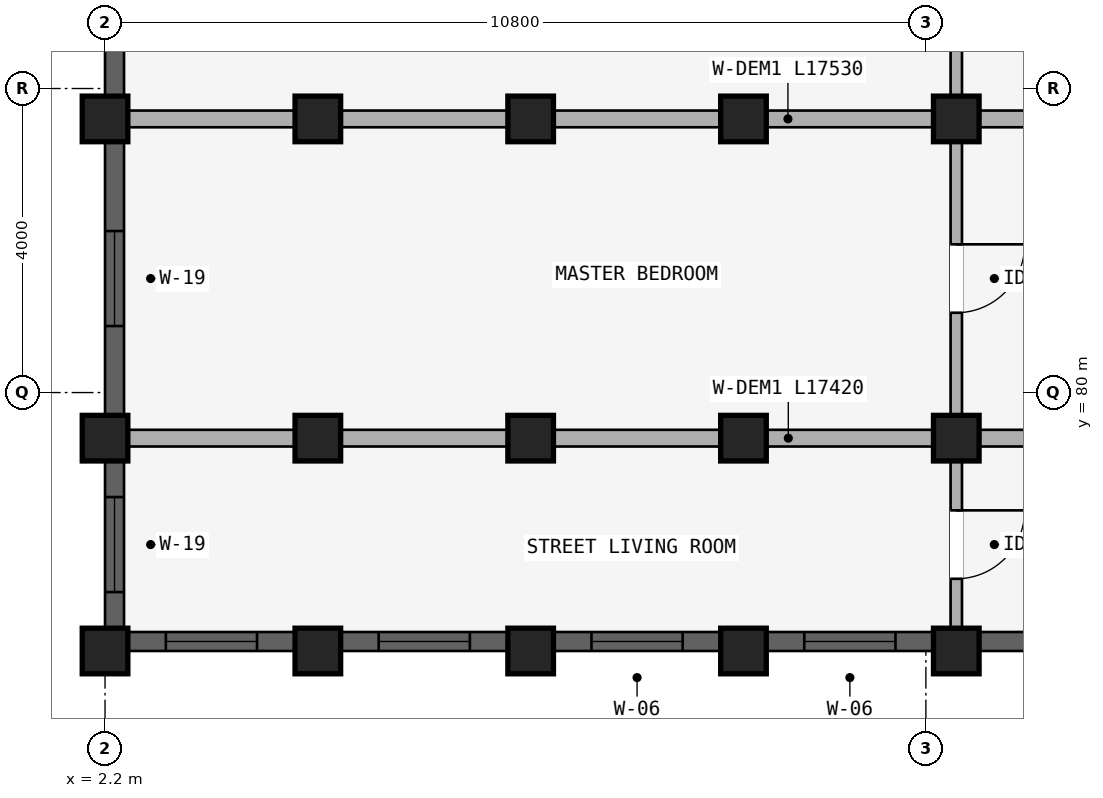
"""IFC4 building model, lengths in metres.
Left out: names, types, materials, properties, quantities, classifications, styles, units other than length and angle.
Written with IfcOpenShell. Run it as: python <this file> out.ifc"""

import sys

from ifc_helpers import new_model, si_unit, direction, frame, frame_2d, origin, origin_2d, place, context, subcontext, project, spatial, rectangle, extrude, element, fill, save


model = new_model("IFC4")
c1 = context("Model", 3, precision=1e-05, world=origin(), true_north=direction((0.0, 1.0)))
c2 = subcontext(c1, "Body", "Model", "MODEL_VIEW")
j1 = project(units=[si_unit("LENGTHUNIT", "METRE"), si_unit("PLANEANGLEUNIT", "RADIAN")], contexts=[c1])
p1 = place(None, origin())
s1 = spatial("IfcSite", under=j1, at=p1, CompositionType="ELEMENT")
p2 = place(p1, origin())
s2 = spatial("IfcBuilding", under=s1, at=p2, CompositionType="ELEMENT")
p3 = place(p2, frame((0.0, 0.0, 37.05)))
s3 = spatial("IfcBuildingStorey", under=s2, at=p3, CompositionType="ELEMENT", Elevation=37.05)
for number, where, z_axis, x_axis in (
    (1, (13.4, 83.6, 0.0), (0.0, 0.0, 1.0), (1.0, 0.0, 0.0)),
    (2, (10.6, 83.6, 0.0), (0.0, 0.0, 1.0), (1.0, 0.0, 0.0)),
    (3, (7.8, 83.6, 0.0), (0.0, 0.0, 1.0), (1.0, 0.0, 0.0)),
    (4, (5.0, 83.6, 0.0), (0.0, 0.0, 1.0), (1.0, 0.0, 0.0)),
):
    element("IfcColumn", number, at=place(p3, frame(where, z_axis=z_axis, x_axis=x_axis)), inside=s3, PredefinedType="COLUMN", context=c2, shape_type="SweptSolid", body=[
        extrude(rectangle(XDim=0.6, YDim=0.6, at=origin_2d()), origin(), (0.0, 0.0, 1.0), 2.93),
    ])
p4 = place(p3, frame((2.2, 83.6, 0.0), z_axis=(0.0, 0.0, 1.0), x_axis=(1.0, 0.0, 0.0)))
e5 = element("IfcColumn", 5, at=p4, inside=s3, PredefinedType="COLUMN", context=c2, shape_type="SweptSolid", body=[
    extrude(rectangle(XDim=0.6, YDim=0.6, at=origin_2d()), origin(), (0.0, 0.0, 1.0), 2.97),
])
for number, where, z_axis, x_axis in (
    (6, (13.4, 79.4, 0.0), (0.0, 0.0, 1.0), (1.0, 0.0, 0.0)),
    (7, (10.6, 79.4, 0.0), (0.0, 0.0, 1.0), (1.0, 0.0, 0.0)),
    (8, (7.8, 79.4, 0.0), (0.0, 0.0, 1.0), (1.0, 0.0, 0.0)),
    (9, (5.0, 79.4, 0.0), (0.0, 0.0, 1.0), (1.0, 0.0, 0.0)),
):
    element("IfcColumn", number, at=place(p3, frame(where, z_axis=z_axis, x_axis=x_axis)), inside=s3, PredefinedType="COLUMN", context=c2, shape_type="SweptSolid", body=[
        extrude(rectangle(XDim=0.6, YDim=0.6, at=origin_2d()), origin(), (0.0, 0.0, 1.0), 2.93),
    ])
p5 = place(p3, frame((2.2, 79.4, 0.0), z_axis=(0.0, 0.0, 1.0), x_axis=(1.0, 0.0, 0.0)))
e10 = element("IfcColumn", 10, at=p5, inside=s3, PredefinedType="COLUMN", context=c2, shape_type="SweptSolid", body=[
    extrude(rectangle(XDim=0.6, YDim=0.6, at=origin_2d()), origin(), (0.0, 0.0, 1.0), 2.97),
])
for number, where, z_axis, x_axis in (
    (11, (13.4, 76.6, 0.0), (0.0, 0.0, 1.0), (1.0, 0.0, 0.0)),
    (12, (10.6, 76.6, 0.0), (0.0, 0.0, 1.0), (1.0, 0.0, 0.0)),
    (13, (7.8, 76.6, 0.0), (0.0, 0.0, 1.0), (1.0, 0.0, 0.0)),
    (14, (5.0, 76.6, 0.0), (0.0, 0.0, 1.0), (1.0, 0.0, 0.0)),
):
    element("IfcColumn", number, at=place(p3, frame(where, z_axis=z_axis, x_axis=x_axis)), inside=s3, PredefinedType="COLUMN", context=c2, shape_type="SweptSolid", body=[
        extrude(rectangle(XDim=0.6, YDim=0.6, at=origin_2d()), origin(), (0.0, 0.0, 1.0), 2.93),
    ])
p6 = place(p3, frame((2.2, 76.6, 0.0), z_axis=(0.0, 0.0, 1.0), x_axis=(1.0, 0.0, 0.0)))
e15 = element("IfcColumn", 15, at=p6, inside=s3, PredefinedType="COLUMN", context=c2, shape_type="SweptSolid", body=[
    extrude(rectangle(XDim=0.6, YDim=0.6, at=origin_2d()), origin(), (0.0, 0.0, 1.0), 2.97),
])
p7 = place(p3, frame((13.4, 87.57, 0.0), z_axis=(0.0, 0.0, 1.0), x_axis=(0.0, -1.0, 0.0)))
e16 = element("IfcWall", 16, at=p7, inside=s3, PredefinedType="PARTITIONING", context=c2, shape_type="SweptSolid", body=[
    extrude(rectangle(XDim=3.89, YDim=0.15, at=frame_2d((1.945, 0.0))), origin(), (0.0, 0.0, 1.0), 2.372),
])
p8 = place(p7, frame((1.495, 0.0, 0.0)))
e17 = element("IfcOpeningElement", 17, at=p8, cuts=e16, PredefinedType="OPENING", context=c2, shape_type="SweptSolid", body=[
    extrude(rectangle(XDim=0.9, YDim=2.1, at=frame_2d((0.45, 1.05))), frame((0.0, 0.085, 0.0), z_axis=(0.0, -1.0, 0.0), x_axis=(1.0, 0.0, 0.0)), (0.0, 0.0, 1.0), 0.17),
])
p9 = place(p3, frame((13.4, 83.52, 0.0), z_axis=(0.0, 0.0, 1.0), x_axis=(0.0, -1.0, 0.0)))
e18 = element("IfcWall", 18, at=p9, inside=s3, PredefinedType="PARTITIONING", context=c2, shape_type="SweptSolid", body=[
    extrude(rectangle(XDim=4.04, YDim=0.15, at=frame_2d((2.02, 0.0))), origin(), (0.0, 0.0, 1.0), 2.372),
])
p10 = place(p9, frame((1.57, 0.0, 0.0)))
e19 = element("IfcOpeningElement", 19, at=p10, cuts=e18, PredefinedType="OPENING", context=c2, shape_type="SweptSolid", body=[
    extrude(rectangle(XDim=0.9, YDim=2.1, at=frame_2d((0.45, 1.05))), frame((0.0, 0.085, 0.0), z_axis=(0.0, -1.0, 0.0), x_axis=(1.0, 0.0, 0.0)), (0.0, 0.0, 1.0), 0.17),
])
p11 = place(p3, frame((19.95, 83.6, 0.0), z_axis=(0.0, 0.0, 1.0), x_axis=(-1.0, 0.0, 0.0)))
e20 = element("IfcWall", 20, at=p11, inside=s3, PredefinedType="STANDARD", context=c2, shape_type="SweptSolid", body=[
    extrude(rectangle(XDim=17.53, YDim=0.22, at=frame_2d((8.765, 0.0))), origin(), (0.0, 0.0, 1.0), 2.372),
])
p12 = place(p3, frame((13.4, 79.32, 0.0), z_axis=(0.0, 0.0, 1.0), x_axis=(0.0, -1.0, 0.0)))
e21 = element("IfcWall", 21, at=p12, inside=s3, PredefinedType="PLUMBINGWALL", context=c2, shape_type="SweptSolid", body=[
    extrude(rectangle(XDim=2.64, YDim=0.15, at=frame_2d((1.32, 0.0))), origin(), (0.0, 0.0, 1.0), 2.372),
])
p13 = place(p12, frame((0.87, 0.0, 0.0)))
e22 = element("IfcOpeningElement", 22, at=p13, cuts=e21, PredefinedType="OPENING", context=c2, shape_type="SweptSolid", body=[
    extrude(rectangle(XDim=0.9, YDim=2.1, at=frame_2d((0.45, 1.05))), frame((0.0, 0.085, 0.0), z_axis=(0.0, -1.0, 0.0), x_axis=(1.0, 0.0, 0.0)), (0.0, 0.0, 1.0), 0.17),
])
p14 = place(p3, frame((19.9, 79.4, 0.0), z_axis=(0.0, 0.0, 1.0), x_axis=(-1.0, 0.0, 0.0)))
e23 = element("IfcWall", 23, at=p14, inside=s3, PredefinedType="STANDARD", context=c2, shape_type="SweptSolid", body=[
    extrude(rectangle(XDim=17.42, YDim=0.22, at=frame_2d((8.71, 0.0))), origin(), (0.0, 0.0, 1.0), 2.372),
])
p15 = place(p3, frame((2.325, 87.497, 0.0), z_axis=(0.0, 0.0, 1.0), x_axis=(0.0, -1.0, 0.0)))
e24 = element("IfcWall", 24, at=p15, inside=s3, PredefinedType="STANDARD", context=c2, shape_type="SweptSolid", body=[
    extrude(rectangle(XDim=3.593, YDim=0.25, at=frame_2d((1.796, 0.0))), origin(), (0.0, 0.0, 1.0), 2.48),
])
p16 = place(p15, frame((1.171, 0.0, 0.73)))
e25 = element("IfcOpeningElement", 25, at=p16, cuts=e24, PredefinedType="OPENING", context=c2, shape_type="SweptSolid", body=[
    extrude(rectangle(XDim=1.25, YDim=1.55, at=frame_2d((0.625, 0.775))), frame((0.0, 0.135, 0.0), z_axis=(0.0, -1.0, 0.0), x_axis=(1.0, 0.0, 0.0)), (0.0, 0.0, 1.0), 0.27),
])
p17 = place(p3, frame((2.325, 83.296, 0.0), z_axis=(0.0, 0.0, 1.0), x_axis=(0.0, -1.0, 0.0)))
e26 = element("IfcWall", 26, at=p17, inside=s3, PredefinedType="STANDARD", context=c2, shape_type="SweptSolid", body=[
    extrude(rectangle(XDim=3.593, YDim=0.25, at=frame_2d((1.796, 0.0))), origin(), (0.0, 0.0, 1.0), 2.48),
])
p18 = place(p17, frame((1.171, 0.0, 0.73)))
e27 = element("IfcOpeningElement", 27, at=p18, cuts=e26, PredefinedType="OPENING", context=c2, shape_type="SweptSolid", body=[
    extrude(rectangle(XDim=1.25, YDim=1.55, at=frame_2d((0.625, 0.775))), frame((0.0, 0.135, 0.0), z_axis=(0.0, -1.0, 0.0), x_axis=(1.0, 0.0, 0.0)), (0.0, 0.0, 1.0), 0.27),
])
p19 = place(p3, frame((2.325, 79.096, 0.0), z_axis=(0.0, 0.0, 1.0), x_axis=(0.0, -1.0, 0.0)))
e28 = element("IfcWall", 28, at=p19, inside=s3, PredefinedType="STANDARD", context=c2, shape_type="SweptSolid", body=[
    extrude(rectangle(XDim=2.193, YDim=0.25, at=frame_2d((1.096, 0.0))), origin(), (0.0, 0.0, 1.0), 2.48),
])
p20 = place(p19, frame((0.471, 0.0, 0.73)))
e29 = element("IfcOpeningElement", 29, at=p20, cuts=e28, PredefinedType="OPENING", context=c2, shape_type="SweptSolid", body=[
    extrude(rectangle(XDim=1.25, YDim=1.55, at=frame_2d((0.625, 0.775))), frame((0.0, 0.135, 0.0), z_axis=(0.0, -1.0, 0.0), x_axis=(1.0, 0.0, 0.0)), (0.0, 0.0, 1.0), 0.27),
])
p21 = place(p3, frame((19.771, 76.725, 0.0), z_axis=(0.0, 0.0, 1.0), x_axis=(-1.0, 0.0, 0.0)))
e30 = element("IfcWall", 30, at=p21, inside=s3, PredefinedType="STANDARD", context=c2, shape_type="SweptSolid", body=[
    extrude(rectangle(XDim=6.068, YDim=0.25, at=frame_2d((3.034, 0.0))), origin(), (0.0, 0.0, 1.0), 2.372),
])
p22 = place(p21, frame((2.322, 0.0, 0.522)))
e31 = element("IfcOpeningElement", 31, at=p22, cuts=e30, PredefinedType="OPENING", context=c2, shape_type="SweptSolid", body=[
    extrude(rectangle(XDim=1.5, YDim=1.65, at=frame_2d((0.75, 0.825))), frame((0.0, 0.135, 0.0), z_axis=(0.0, -1.0, 0.0), x_axis=(1.0, 0.0, 0.0)), (0.0, 0.0, 1.0), 0.27),
])
p23 = place(p3, frame((13.096, 76.725, 0.0), z_axis=(0.0, 0.0, 1.0), x_axis=(-1.0, 0.0, 0.0)))
e32 = element("IfcWall", 32, at=p23, inside=s3, PredefinedType="STANDARD", context=c2, shape_type="SweptSolid", body=[
    extrude(rectangle(XDim=2.193, YDim=0.25, at=frame_2d((1.096, 0.0))), origin(), (0.0, 0.0, 1.0), 2.372),
])
p24 = place(p23, frame((0.497, 0.0, 0.672)))
e33 = element("IfcOpeningElement", 33, at=p24, cuts=e32, PredefinedType="OPENING", context=c2, shape_type="SweptSolid", body=[
    extrude(rectangle(XDim=1.2, YDim=1.5, at=frame_2d((0.6, 0.75))), frame((0.0, 0.135, 0.0), z_axis=(0.0, -1.0, 0.0), x_axis=(1.0, 0.0, 0.0)), (0.0, 0.0, 1.0), 0.27),
])
p25 = place(p3, frame((10.296, 76.725, 0.0), z_axis=(0.0, 0.0, 1.0), x_axis=(-1.0, 0.0, 0.0)))
e34 = element("IfcWall", 34, at=p25, inside=s3, PredefinedType="STANDARD", context=c2, shape_type="SweptSolid", body=[
    extrude(rectangle(XDim=2.193, YDim=0.25, at=frame_2d((1.096, 0.0))), origin(), (0.0, 0.0, 1.0), 2.372),
])
p26 = place(p25, frame((0.497, 0.0, 0.672)))
e35 = element("IfcOpeningElement", 35, at=p26, cuts=e34, PredefinedType="OPENING", context=c2, shape_type="SweptSolid", body=[
    extrude(rectangle(XDim=1.2, YDim=1.5, at=frame_2d((0.6, 0.75))), frame((0.0, 0.135, 0.0), z_axis=(0.0, -1.0, 0.0), x_axis=(1.0, 0.0, 0.0)), (0.0, 0.0, 1.0), 0.27),
])
p27 = place(p3, frame((7.497, 76.725, 0.0), z_axis=(0.0, 0.0, 1.0), x_axis=(-1.0, 0.0, 0.0)))
e36 = element("IfcWall", 36, at=p27, inside=s3, PredefinedType="STANDARD", context=c2, shape_type="SweptSolid", body=[
    extrude(rectangle(XDim=2.193, YDim=0.25, at=frame_2d((1.097, 0.0))), origin(), (0.0, 0.0, 1.0), 2.372),
])
p28 = place(p27, frame((0.497, 0.0, 0.672)))
e37 = element("IfcOpeningElement", 37, at=p28, cuts=e36, PredefinedType="OPENING", context=c2, shape_type="SweptSolid", body=[
    extrude(rectangle(XDim=1.2, YDim=1.5, at=frame_2d((0.6, 0.75))), frame((0.0, 0.135, 0.0), z_axis=(0.0, -1.0, 0.0), x_axis=(1.0, 0.0, 0.0)), (0.0, 0.0, 1.0), 0.27),
])
p29 = place(p3, frame((4.697, 76.725, 0.0), z_axis=(0.0, 0.0, 1.0), x_axis=(-1.0, 0.0, 0.0)))
e38 = element("IfcWall", 38, at=p29, inside=s3, PredefinedType="STANDARD", context=c2, shape_type="SweptSolid", body=[
    extrude(rectangle(XDim=2.193, YDim=0.25, at=frame_2d((1.097, 0.0))), origin(), (0.0, 0.0, 1.0), 2.412),
])
p30 = place(p29, frame((0.497, 0.0, 0.712)))
e39 = element("IfcOpeningElement", 39, at=p30, cuts=e38, PredefinedType="OPENING", context=c2, shape_type="SweptSolid", body=[
    extrude(rectangle(XDim=1.2, YDim=1.5, at=frame_2d((0.6, 0.75))), frame((0.0, 0.135, 0.0), z_axis=(0.0, -1.0, 0.0), x_axis=(1.0, 0.0, 0.0)), (0.0, 0.0, 1.0), 0.27),
])
p31 = place(p18, origin())
e40 = element("IfcWindow", 40, at=p31, inside=s3, PartitioningType="SINGLE_PANEL", PredefinedType="WINDOW", context=c2, shape_type="SweptSolid", body=[
    extrude(rectangle(XDim=1.25, YDim=1.55, at=frame_2d((0.625, 0.775))), frame((0.0, 0.03, 0.0), z_axis=(0.0, -1.0, 0.0), x_axis=(1.0, 0.0, 0.0)), (0.0, 0.0, 1.0), 0.06),
])
fill(e27, e40)
p32 = place(p20, origin())
e41 = element("IfcWindow", 41, at=p32, inside=s3, PartitioningType="SINGLE_PANEL", PredefinedType="WINDOW", context=c2, shape_type="SweptSolid", body=[
    extrude(rectangle(XDim=1.25, YDim=1.55, at=frame_2d((0.625, 0.775))), frame((0.0, 0.03, 0.0), z_axis=(0.0, -1.0, 0.0), x_axis=(1.0, 0.0, 0.0)), (0.0, 0.0, 1.0), 0.06),
])
fill(e29, e41)
p33 = place(p24, origin())
e42 = element("IfcWindow", 42, at=p33, inside=s3, PartitioningType="SINGLE_PANEL", PredefinedType="WINDOW", context=c2, shape_type="SweptSolid", body=[
    extrude(rectangle(XDim=1.2, YDim=1.5, at=frame_2d((0.6, 0.75))), frame((0.0, 0.03, 0.0), z_axis=(0.0, -1.0, 0.0), x_axis=(1.0, 0.0, 0.0)), (0.0, 0.0, 1.0), 0.06),
])
fill(e33, e42)
p34 = place(p26, origin())
e43 = element("IfcWindow", 43, at=p34, inside=s3, PartitioningType="SINGLE_PANEL", PredefinedType="WINDOW", context=c2, shape_type="SweptSolid", body=[
    extrude(rectangle(XDim=1.2, YDim=1.5, at=frame_2d((0.6, 0.75))), frame((0.0, 0.03, 0.0), z_axis=(0.0, -1.0, 0.0), x_axis=(1.0, 0.0, 0.0)), (0.0, 0.0, 1.0), 0.06),
])
fill(e35, e43)
p35 = place(p28, origin())
e44 = element("IfcWindow", 44, at=p35, inside=s3, PartitioningType="SINGLE_PANEL", PredefinedType="WINDOW", context=c2, shape_type="SweptSolid", body=[
    extrude(rectangle(XDim=1.2, YDim=1.5, at=frame_2d((0.6, 0.75))), frame((0.0, 0.03, 0.0), z_axis=(0.0, -1.0, 0.0), x_axis=(1.0, 0.0, 0.0)), (0.0, 0.0, 1.0), 0.06),
])
fill(e37, e44)
p36 = place(p30, origin())
e45 = element("IfcWindow", 45, at=p36, inside=s3, PartitioningType="SINGLE_PANEL", PredefinedType="WINDOW", context=c2, shape_type="SweptSolid", body=[
    extrude(rectangle(XDim=1.2, YDim=1.5, at=frame_2d((0.6, 0.75))), frame((0.0, 0.03, 0.0), z_axis=(0.0, -1.0, 0.0), x_axis=(1.0, 0.0, 0.0)), (0.0, 0.0, 1.0), 0.06),
])
fill(e39, e45)
p37 = place(p10, frame((0.9, 0.0, 0.0), z_axis=(0.0, 0.0, 1.0), x_axis=(-1.0, 0.0, 0.0)))
e46 = element("IfcDoor", 46, at=p37, inside=s3, OperationType="SINGLE_SWING_RIGHT", PredefinedType="DOOR", context=c2, shape_type="SweptSolid", body=[
    extrude(rectangle(XDim=0.9, YDim=2.1, at=frame_2d((0.45, 1.05))), frame((0.0, 0.025, 0.0), z_axis=(0.0, -1.0, 0.0), x_axis=(1.0, 0.0, 0.0)), (0.0, 0.0, 1.0), 0.05),
])
fill(e19, e46)
p38 = place(p13, frame((0.9, 0.0, 0.0), z_axis=(0.0, 0.0, 1.0), x_axis=(-1.0, 0.0, 0.0)))
e47 = element("IfcDoor", 47, at=p38, inside=s3, OperationType="SINGLE_SWING_RIGHT", PredefinedType="DOOR", context=c2, shape_type="SweptSolid", body=[
    extrude(rectangle(XDim=0.9, YDim=2.1, at=frame_2d((0.45, 1.05))), frame((0.0, 0.025, 0.0), z_axis=(0.0, -1.0, 0.0), x_axis=(1.0, 0.0, 0.0)), (0.0, 0.0, 1.0), 0.05),
])
fill(e22, e47)
save(model, sys.argv[1])
